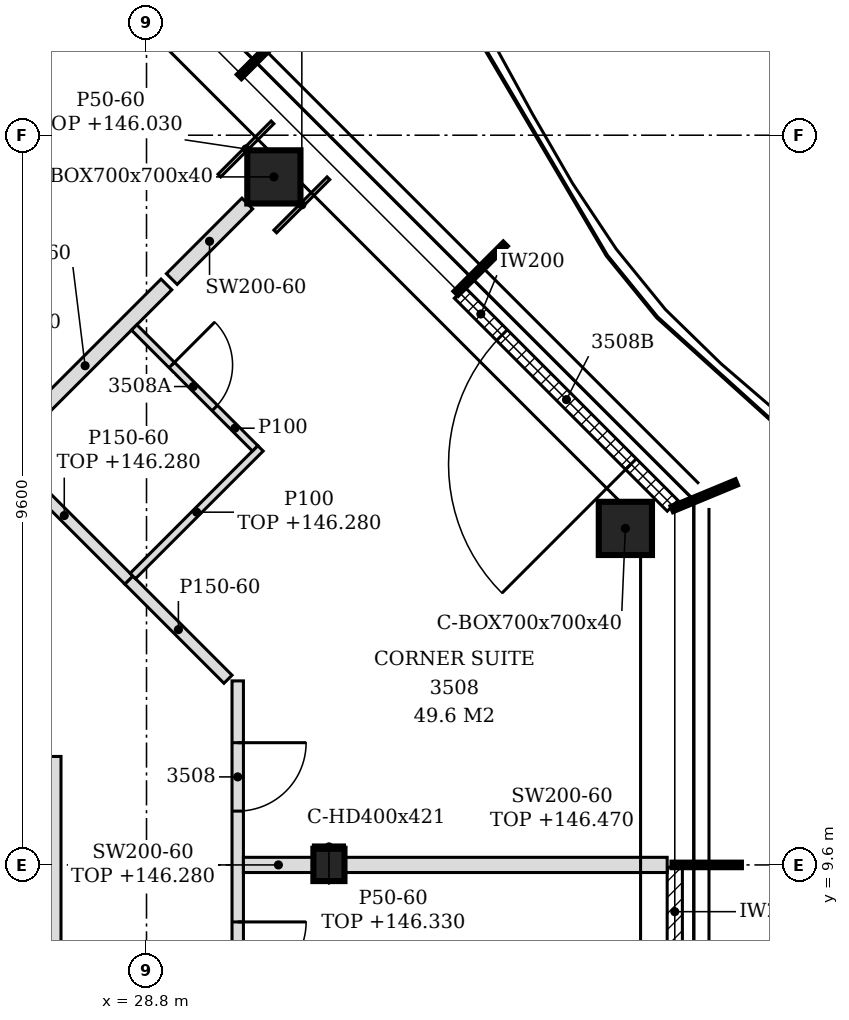
"""IFC4 building model, lengths in metres.
Left out: names, types, materials, properties, quantities, classifications, styles, units other than length and angle.
Written with IfcOpenShell. Run it as: python <this file> out.ifc"""

import sys

from ifc_helpers import new_model, si_unit, direction, frame, frame_2d, origin, origin_2d, place, context, subcontext, project, spatial, polyline, rectangle, hollow_rectangle, i_section, outline, extrude, element, fill, save


model = new_model("IFC4")
c1 = context("Model", 3, precision=1e-05, world=origin(), true_north=direction((0.0, 1.0)))
c2 = subcontext(c1, "Body", "Model", "MODEL_VIEW")
j1 = project(units=[si_unit("LENGTHUNIT", "METRE"), si_unit("PLANEANGLEUNIT", "RADIAN")], contexts=[c1])
p1 = place(None, origin())
s1 = spatial("IfcSite", under=j1, at=p1, CompositionType="ELEMENT")
p2 = place(p1, origin())
s2 = spatial("IfcBuilding", under=s1, at=p2, CompositionType="ELEMENT")
p3 = place(p2, frame((0.0, 0.0, 143.4)))
s3 = spatial("IfcBuildingStorey", under=s2, at=p3, CompositionType="ELEMENT", Elevation=143.4)
for number, where, z_axis, x_axis in (
    (1, (35.1, 14.027, -0.15), (0.0, 0.0, 1.0), (1.0, 0.0, 0.0)),
    (2, (30.476, 18.652, -0.15), (0.0, 0.0, 1.0), (1.0, 0.0, 0.0)),
):
    element("IfcColumn", number, at=place(p3, frame(where, z_axis=z_axis, x_axis=x_axis)), inside=s3, PredefinedType="COLUMN", context=c2, shape_type="SweptSolid", body=[
        extrude(hollow_rectangle(XDim=0.7, YDim=0.7, WallThickness=0.04, at=origin_2d()), origin(), (0.0, 0.0, 1.0), 3.6),
    ])
p4 = place(p3, frame((31.2, 9.6, -0.15), z_axis=(0.0, 0.0, 1.0), x_axis=(1.0, 0.0, 0.0)))
e3 = element("IfcColumn", 3, at=p4, inside=s3, PredefinedType="COLUMN", context=c2, shape_type="SweptSolid", body=[
    extrude(i_section(OverallWidth=0.409, OverallDepth=0.425, WebThickness=0.033, FlangeThickness=0.052, FilletRadius=0.015, at=origin_2d()), origin(), (0.0, 0.0, 1.0), 3.6),
])
p5 = place(p3, frame((35.75, 4.83, 0.0), z_axis=(0.0, 0.0, 1.0), x_axis=(0.0, 1.0, 0.0)))
e4 = element("IfcWall", 4, at=p5, inside=s3, PredefinedType="NOTDEFINED", context=c2, shape_type="SweptSolid", body=[
    extrude(rectangle(XDim=4.74, YDim=0.2, at=frame_2d((2.37, 0.0))), origin(), (0.0, 0.0, 1.0), 3.45),
])
p6 = place(p5, frame((1.17, 0.0, 0.0)))
e5 = element("IfcOpeningElement", 5, at=p6, cuts=e4, PredefinedType="OPENING", context=c2, shape_type="SweptSolid", body=[
    extrude(rectangle(XDim=2.4, YDim=2.4, at=frame_2d((1.2, 1.2))), frame((0.0, 0.11, 0.0), z_axis=(0.0, -1.0, 0.0), x_axis=(1.0, 0.0, 0.0)), (0.0, 0.0, 1.0), 0.22),
])
p7 = place(p3, frame((35.722, 14.325, 0.0), z_axis=(0.0, 0.0, 1.0), x_axis=(-0.707106781187, 0.707106781187, 0.0)))
e6 = element("IfcWall", 6, at=p7, inside=s3, PredefinedType="NOTDEFINED", context=c2, shape_type="SweptSolid", body=[
    extrude(rectangle(XDim=3.962, YDim=0.2, at=frame_2d((1.981, 0.0))), origin(), (0.0, 0.0, 1.0), 3.45),
])
p8 = place(p7, frame((0.775, 0.0, 0.0)))
e7 = element("IfcOpeningElement", 7, at=p8, cuts=e6, PredefinedType="OPENING", context=c2, shape_type="SweptSolid", body=[
    extrude(rectangle(XDim=2.4, YDim=2.4, at=frame_2d((1.2, 1.2))), frame((0.0, 0.11, 0.0), z_axis=(0.0, -1.0, 0.0), x_axis=(1.0, 0.0, 0.0)), (0.0, 0.0, 1.0), 0.22),
])
p9 = place(p3, frame((30.0, -0.813, 0.0), z_axis=(0.0, 0.0, 1.0), x_axis=(0.0, 1.0, 0.0)))
e8 = element("IfcWall", 8, at=p9, inside=s3, PredefinedType="PARTITIONING", context=c2, shape_type="SweptSolid", body=[
    extrude(outline(polyline([(0.0, 0.0), (12.834, 0.0), (12.834, 3.45), (10.518, 3.45), (10.516, 2.88), (10.308, 2.88), (10.306, 3.45), (5.718, 3.45), (5.716, 2.88), (5.508, 2.88), (5.506, 3.45), (0.918, 3.45), (0.916, 2.88), (0.708, 2.88), (0.706, 3.45), (0.0, 3.45), (0.0, 0.0)])), frame((0.0, 0.075, 0.0), z_axis=(0.0, -1.0, 0.0), x_axis=(1.0, 0.0, 0.0)), (0.0, 0.0, 1.0), 0.15),
])
p10 = place(p9, frame((1.563, 0.0, 0.0)))
e9 = element("IfcOpeningElement", 9, at=p10, cuts=e8, PredefinedType="OPENING", context=c2, shape_type="SweptSolid", body=[
    extrude(rectangle(XDim=0.9, YDim=2.1, at=frame_2d((0.45, 1.05))), frame((0.0, 0.085, 0.0), z_axis=(0.0, -1.0, 0.0), x_axis=(1.0, 0.0, 0.0)), (0.0, 0.0, 1.0), 0.17),
])
p11 = place(p9, frame((8.763, 0.0, 0.0)))
e10 = element("IfcOpeningElement", 10, at=p11, cuts=e8, PredefinedType="OPENING", context=c2, shape_type="SweptSolid", body=[
    extrude(rectangle(XDim=0.9, YDim=2.1, at=frame_2d((0.45, 1.05))), frame((0.0, 0.085, 0.0), z_axis=(0.0, -1.0, 0.0), x_axis=(1.0, 0.0, 0.0)), (0.0, 0.0, 1.0), 0.17),
])
p12 = place(p9, frame((11.121, 0.0, 0.0)))
e11 = element("IfcOpeningElement", 11, at=p12, cuts=e8, PredefinedType="OPENING", context=c2, shape_type="SweptSolid", body=[
    extrude(rectangle(XDim=0.9, YDim=2.1, at=frame_2d((0.45, 1.05))), frame((0.0, 0.085, 0.0), z_axis=(0.0, -1.0, 0.0), x_axis=(1.0, 0.0, 0.0)), (0.0, 0.0, 1.0), 0.17),
])
p13 = place(p3, frame((27.6, 3.675, 0.0), z_axis=(0.0, 0.0, 1.0), x_axis=(0.0, 1.0, 0.0)))
e12 = element("IfcWall", 12, at=p13, inside=s3, PredefinedType="PARTITIONING", context=c2, shape_type="SweptSolid", body=[
    extrude(outline(polyline([(0.0, 0.0), (7.352, 0.0), (7.352, 3.45), (6.03, 3.45), (6.028, 2.88), (5.82, 2.88), (5.818, 3.45), (1.23, 3.45), (1.228, 2.88), (1.02, 2.88), (1.018, 3.45), (0.0, 3.45), (0.0, 0.0)])), frame((0.0, 0.075, 0.0), z_axis=(0.0, -1.0, 0.0), x_axis=(1.0, 0.0, 0.0)), (0.0, 0.0, 1.0), 0.15),
])
p14 = place(p3, frame((30.075, 9.6, 0.0), z_axis=(0.0, 0.0, 1.0), x_axis=(1.0, 0.0, 0.0)))
e13 = element("IfcWall", 13, at=p14, inside=s3, PredefinedType="PARTITIONING", context=c2, shape_type="SweptSolid", body=[
    extrude(rectangle(XDim=0.921, YDim=0.2, at=frame_2d((0.46, 0.0))), origin(), (0.0, 0.0, 1.0), 2.88),
])
p15 = place(p3, frame((31.405, 9.6, 0.0), z_axis=(0.0, 0.0, 1.0), x_axis=(1.0, 0.0, 0.0)))
e14 = element("IfcWall", 14, at=p15, inside=s3, PredefinedType="PARTITIONING", context=c2, shape_type="SweptSolid", body=[
    extrude(outline(polyline([(0.0, 0.0), (4.245, 0.0), (4.246, 3.07), (3.845, 3.07), (3.844, 2.93), (3.545, 2.93), (3.543, 3.07), (0.0, 3.07), (0.0, 0.0)])), frame((0.0, 0.1, 0.0), z_axis=(0.0, -1.0, 0.0), x_axis=(1.0, 0.0, 0.0)), (0.0, 0.0, 1.0), 0.2),
])
p16 = place(p3, frame((29.872, 12.043, 0.0), z_axis=(0.0, 0.0, 1.0), x_axis=(-0.707172918471, 0.707040637716, 0.0)))
e15 = element("IfcWall", 15, at=p16, inside=s3, PredefinedType="PARTITIONING", context=c2, shape_type="SweptSolid", body=[
    extrude(rectangle(XDim=1.846, YDim=0.15, at=frame_2d((0.923, 0.0))), origin(), (0.0, 0.0, 1.0), 3.45),
])
p17 = place(p3, frame((28.567, 13.348, 0.0), z_axis=(0.0, 0.0, 1.0), x_axis=(-0.707310148094, 0.706903355773, 0.0)))
e16 = element("IfcWall", 16, at=p17, inside=s3, PredefinedType="PARTITIONING", context=c2, shape_type="SweptSolid", body=[
    extrude(rectangle(XDim=2.401, YDim=0.15, at=frame_2d((1.2, 0.0))), origin(), (0.0, 0.0, 1.0), 2.88),
])
p18 = place(p3, frame((28.62, 13.401, 0.0), z_axis=(0.0, 0.0, 1.0), x_axis=(0.707055379538, 0.707158179099, 0.0)))
e17 = element("IfcWall", 17, at=p18, inside=s3, PredefinedType="PARTITIONING", context=c2, shape_type="SweptSolid", body=[
    extrude(rectangle(XDim=2.375, YDim=0.1, at=frame_2d((1.188, 0.0))), origin(), (0.0, 0.0, 1.0), 2.88),
])
p19 = place(p3, frame((26.922, 15.098, 0.0), z_axis=(0.0, 0.0, 1.0), x_axis=(0.707268147401, 0.706945378138, 0.0)))
e18 = element("IfcWall", 18, at=p19, inside=s3, PredefinedType="PARTITIONING", context=c2, shape_type="SweptSolid", body=[
    extrude(rectangle(XDim=3.026, YDim=0.2, at=frame_2d((1.513, 0.0))), origin(), (0.0, 0.0, 1.0), 3.45),
])
p20 = place(p3, frame((30.229, 15.08, 0.0), z_axis=(0.0, 0.0, 1.0), x_axis=(-0.707052524, 0.70716103421, 0.0)))
e19 = element("IfcWall", 19, at=p20, inside=s3, PredefinedType="PARTITIONING", context=c2, shape_type="SweptSolid", body=[
    extrude(rectangle(XDim=2.25, YDim=0.1, at=frame_2d((1.125, 0.0))), origin(), (0.0, 0.0, 1.0), 3.45),
])
p21 = place(p20, frame((0.75, 0.0, 0.0)))
e20 = element("IfcOpeningElement", 20, at=p21, cuts=e19, PredefinedType="OPENING", context=c2, shape_type="SweptSolid", body=[
    extrude(rectangle(XDim=0.8, YDim=2.1, at=frame_2d((0.4, 1.05))), frame((0.0, 0.06, 0.0), z_axis=(0.0, -1.0, 0.0), x_axis=(1.0, 0.0, 0.0)), (0.0, 0.0, 1.0), 0.12),
])
p22 = place(p3, frame((29.133, 17.308, 0.0), z_axis=(0.0, 0.0, 1.0), x_axis=(0.70693298083, 0.707280538835, 0.0)))
e21 = element("IfcWall", 21, at=p22, inside=s3, PredefinedType="PARTITIONING", context=c2, shape_type="SweptSolid", body=[
    extrude(rectangle(XDim=1.405, YDim=0.2, at=frame_2d((0.702, 0.0))), origin(), (0.0, 0.0, 1.0), 3.45),
])
p23 = place(p3, frame((30.996, 9.837, 0.0), z_axis=(0.0, 0.0, 1.0), x_axis=(1.0, 0.0, 0.0)))
e22 = element("IfcWall", 22, at=p23, inside=s3, PredefinedType="PARTITIONING", context=c2, shape_type="SweptSolid", body=[
    extrude(rectangle(XDim=0.409, YDim=0.05, at=frame_2d((0.205, 0.0))), origin(), (0.0, 0.0, 1.0), 2.93),
])
p24 = place(p3, frame((29.758, 18.669, 0.0), z_axis=(0.0, 0.0, 1.0), x_axis=(0.706983473703, 0.707230067171, 0.0)))
e23 = element("IfcWall", 23, at=p24, inside=s3, PredefinedType="PARTITIONING", context=c2, shape_type="SweptSolid", body=[
    extrude(rectangle(XDim=0.99, YDim=0.05, at=frame_2d((0.495, 0.0))), origin(), (0.0, 0.0, 1.0), 2.63),
])
p25 = place(p3, frame((30.493, 17.934, 0.0), z_axis=(0.0, 0.0, 1.0), x_axis=(0.706983473703, 0.707230067171, 0.0)))
e24 = element("IfcWall", 24, at=p25, inside=s3, PredefinedType="PARTITIONING", context=c2, shape_type="SweptSolid", body=[
    extrude(rectangle(XDim=0.99, YDim=0.05, at=frame_2d((0.495, 0.0))), origin(), (0.0, 0.0, 1.0), 2.93),
])
p26 = place(p8, origin())
e25 = element("IfcDoor", 25, at=p26, inside=s3, OperationType="SINGLE_SWING_LEFT", PredefinedType="DOOR", context=c2, shape_type="SweptSolid", body=[
    extrude(rectangle(XDim=2.4, YDim=2.4, at=frame_2d((1.2, 1.2))), frame((0.0, 0.025, 0.0), z_axis=(0.0, -1.0, 0.0), x_axis=(1.0, 0.0, 0.0)), (0.0, 0.0, 1.0), 0.05),
])
fill(e7, e25)
p27 = place(p11, frame((0.9, 0.0, 0.0), z_axis=(0.0, 0.0, 1.0), x_axis=(-1.0, 0.0, 0.0)))
e26 = element("IfcDoor", 26, at=p27, inside=s3, OperationType="SINGLE_SWING_LEFT", PredefinedType="DOOR", context=c2, shape_type="SweptSolid", body=[
    extrude(rectangle(XDim=0.9, YDim=2.1, at=frame_2d((0.45, 1.05))), frame((0.0, 0.025, 0.0), z_axis=(0.0, -1.0, 0.0), x_axis=(1.0, 0.0, 0.0)), (0.0, 0.0, 1.0), 0.05),
])
fill(e10, e26)
p28 = place(p12, frame((0.9, 0.0, 0.0), z_axis=(0.0, 0.0, 1.0), x_axis=(-1.0, 0.0, 0.0)))
e27 = element("IfcDoor", 27, at=p28, inside=s3, OperationType="SINGLE_SWING_LEFT", PredefinedType="DOOR", context=c2, shape_type="SweptSolid", body=[
    extrude(rectangle(XDim=0.9, YDim=2.1, at=frame_2d((0.45, 1.05))), frame((0.0, 0.025, 0.0), z_axis=(0.0, -1.0, 0.0), x_axis=(1.0, 0.0, 0.0)), (0.0, 0.0, 1.0), 0.05),
])
fill(e11, e27)
p29 = place(p21, frame((0.8, 0.0, 0.0), z_axis=(0.0, 0.0, 1.0), x_axis=(-1.0, 0.0, 0.0)))
e28 = element("IfcDoor", 28, at=p29, inside=s3, OperationType="SINGLE_SWING_LEFT", PredefinedType="DOOR", context=c2, shape_type="SweptSolid", body=[
    extrude(rectangle(XDim=0.8, YDim=2.1, at=frame_2d((0.4, 1.05))), frame((0.0, 0.025, 0.0), z_axis=(0.0, -1.0, 0.0), x_axis=(1.0, 0.0, 0.0)), (0.0, 0.0, 1.0), 0.05),
])
fill(e20, e28)
save(model, sys.argv[1])
